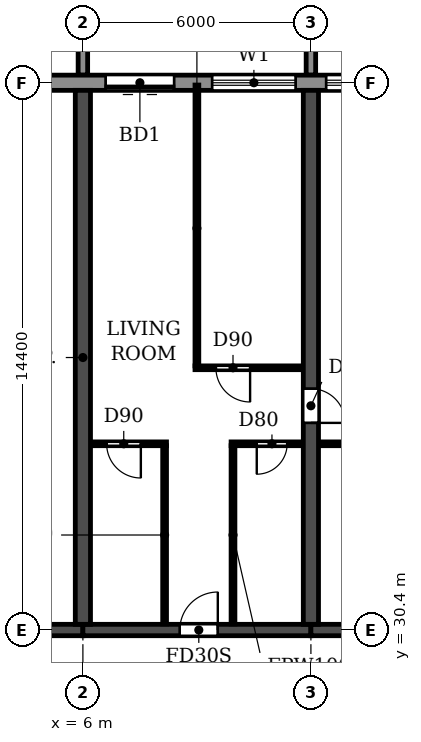
"""IFC4 building model, lengths in metres.
Left out: names, types, materials, properties, quantities, classifications, styles, units other than length and angle.
Written with IfcOpenShell. Run it as: python <this file> out.ifc"""

import sys

from ifc_helpers import new_model, si_unit, direction, frame, frame_2d, origin, place, context, subcontext, project, spatial, polyline, rectangle, outline, extrude, source, transform, mapped, element, fill, save


model = new_model("IFC4")
c1 = context("Model", 3, precision=1e-05, world=origin(), true_north=direction((0.0, 1.0)))
c2 = subcontext(c1, "Body", "Model", "MODEL_VIEW")
j1 = project(units=[si_unit("LENGTHUNIT", "METRE"), si_unit("PLANEANGLEUNIT", "RADIAN")], contexts=[c1])
p1 = place(None, origin())
s1 = spatial("IfcSite", under=j1, at=p1, CompositionType="ELEMENT")
p2 = place(p1, origin())
s2 = spatial("IfcBuilding", under=s1, at=p2, CompositionType="ELEMENT")
p3 = place(p2, frame((0.0, 0.0, 49.8)))
s3 = spatial("IfcBuildingStorey", under=s2, at=p3, CompositionType="ELEMENT", Elevation=49.8)
p4 = place(p3, frame((6.0, 30.55, 0.0), z_axis=(0.0, 0.0, 1.0), x_axis=(0.0, 1.0, 0.0)))
e1 = element("IfcWall", 1, at=p4, inside=s3, PredefinedType="SHEAR", context=c2, shape_type="SweptSolid", body=[
    extrude(rectangle(XDim=14.05, YDim=0.4, at=frame_2d((7.025, 0.0))), origin(), (0.0, 0.0, 1.0), 3.0),
])
p5 = place(p3, frame((12.0, 30.55, 0.0), z_axis=(0.0, 0.0, 1.0), x_axis=(0.0, 1.0, 0.0)))
e2 = element("IfcWall", 2, at=p5, inside=s3, PredefinedType="SHEAR", context=c2, shape_type="SweptSolid", body=[
    extrude(rectangle(XDim=14.05, YDim=0.4, at=frame_2d((7.025, 0.0))), origin(), (0.0, 0.0, 1.0), 3.0),
])
p6 = place(p5, frame((5.3, 0.0, 0.0)))
e3 = element("IfcOpeningElement", 3, at=p6, cuts=e2, PredefinedType="OPENING", context=c2, shape_type="SweptSolid", body=[
    extrude(rectangle(XDim=0.9, YDim=2.1, at=frame_2d((0.45, 1.05))), frame((0.0, 0.21, 0.0), z_axis=(0.0, -1.0, 0.0), x_axis=(1.0, 0.0, 0.0)), (0.0, 0.0, 1.0), 0.42),
])
p7 = place(p3, frame((0.2, 30.4, 0.0), z_axis=(0.0, 0.0, 1.0), x_axis=(1.0, 0.0, 0.0)))
e4 = element("IfcWall", 4, at=p7, inside=s3, PredefinedType="SHEAR", context=c2, shape_type="SweptSolid", body=[
    extrude(rectangle(XDim=5.8, YDim=0.3, at=frame_2d((2.9, 0.0))), origin(), (0.0, 0.0, 1.0), 2.4),
])
p8 = place(p7, frame((2.3, 0.0, 0.0)))
e5 = element("IfcOpeningElement", 5, at=p8, cuts=e4, PredefinedType="OPENING", context=c2, shape_type="SweptSolid", body=[
    extrude(rectangle(XDim=1.0, YDim=2.1, at=frame_2d((0.5, 1.05))), frame((0.0, 0.16, 0.0), z_axis=(0.0, -1.0, 0.0), x_axis=(1.0, 0.0, 0.0)), (0.0, 0.0, 1.0), 0.32),
])
p9 = place(p3, frame((6.0, 30.4, 0.0), z_axis=(0.0, 0.0, 1.0), x_axis=(1.0, 0.0, 0.0)))
e6 = element("IfcWall", 6, at=p9, inside=s3, PredefinedType="SHEAR", context=c2, shape_type="SweptSolid", body=[
    extrude(rectangle(XDim=6.0, YDim=0.3, at=frame_2d((3.0, 0.0))), origin(), (0.0, 0.0, 1.0), 2.4),
])
p10 = place(p9, frame((2.55, 0.0, 0.0)))
e7 = element("IfcOpeningElement", 7, at=p10, cuts=e6, PredefinedType="OPENING", context=c2, shape_type="SweptSolid", body=[
    extrude(rectangle(XDim=1.0, YDim=2.1, at=frame_2d((0.5, 1.05))), frame((0.0, 0.16, 0.0), z_axis=(0.0, -1.0, 0.0), x_axis=(1.0, 0.0, 0.0)), (0.0, 0.0, 1.0), 0.32),
])
p11 = place(p3, frame((12.0, 30.4, 0.0), z_axis=(0.0, 0.0, 1.0), x_axis=(1.0, 0.0, 0.0)))
e8 = element("IfcWall", 8, at=p11, inside=s3, PredefinedType="SHEAR", context=c2, shape_type="SweptSolid", body=[
    extrude(rectangle(XDim=6.0, YDim=0.3, at=frame_2d((3.0, 0.0))), origin(), (0.0, 0.0, 1.0), 2.4),
])
p12 = place(p3, frame((97.317, 44.8, 0.0), z_axis=(0.0, 0.0, 1.0), x_axis=(-1.0, 0.0, 0.0)))
e9 = element("IfcWall", 9, at=p12, inside=s3, PredefinedType="STANDARD", context=c2, shape_type="SweptSolid", body=[
    extrude(rectangle(XDim=92.634, YDim=0.4, at=frame_2d((46.317, 0.0))), origin(), (0.0, 0.0, 1.0), 3.0),
])
p13 = place(p12, frame((88.917, 0.0, 0.0)))
e10 = element("IfcOpeningElement", 10, at=p13, cuts=e9, PredefinedType="OPENING", context=c2, shape_type="SweptSolid", body=[
    extrude(rectangle(XDim=1.8, YDim=2.4, at=frame_2d((0.9, 1.2))), frame((0.0, 0.21, 0.0), z_axis=(0.0, -1.0, 0.0), x_axis=(1.0, 0.0, 0.0)), (0.0, 0.0, 1.0), 0.42),
])
p14 = place(p12, frame((85.717, 0.0, 0.9)))
e11 = element("IfcOpeningElement", 11, at=p14, cuts=e9, PredefinedType="OPENING", context=c2, shape_type="SweptSolid", body=[
    extrude(rectangle(XDim=2.2, YDim=1.5, at=frame_2d((1.1, 0.75))), frame((0.0, 0.21, 0.0), z_axis=(0.0, -1.0, 0.0), x_axis=(1.0, 0.0, 0.0)), (0.0, 0.0, 1.0), 0.42),
])
p15 = place(p12, frame((82.717, 0.0, 0.9)))
e12 = element("IfcOpeningElement", 12, at=p15, cuts=e9, PredefinedType="OPENING", context=c2, shape_type="SweptSolid", body=[
    extrude(rectangle(XDim=2.2, YDim=1.5, at=frame_2d((1.1, 0.75))), frame((0.0, 0.21, 0.0), z_axis=(0.0, -1.0, 0.0), x_axis=(1.0, 0.0, 0.0)), (0.0, 0.0, 1.0), 0.42),
])
p16 = place(p12, frame((79.717, 0.0, 0.9)))
e13 = element("IfcOpeningElement", 13, at=p16, cuts=e9, PredefinedType="OPENING", context=c2, shape_type="SweptSolid", body=[
    extrude(rectangle(XDim=2.2, YDim=1.5, at=frame_2d((1.1, 0.75))), frame((0.0, 0.21, 0.0), z_axis=(0.0, -1.0, 0.0), x_axis=(1.0, 0.0, 0.0)), (0.0, 0.0, 1.0), 0.42),
])
p17 = place(p12, frame((76.717, 0.0, 0.9)))
e14 = element("IfcOpeningElement", 14, at=p17, cuts=e9, PredefinedType="OPENING", context=c2, shape_type="SweptSolid", body=[
    extrude(rectangle(XDim=2.2, YDim=1.5, at=frame_2d((1.1, 0.75))), frame((0.0, 0.21, 0.0), z_axis=(0.0, -1.0, 0.0), x_axis=(1.0, 0.0, 0.0)), (0.0, 0.0, 1.0), 0.42),
])
p18 = place(p12, frame((73.917, 0.0, 0.0)))
e15 = element("IfcOpeningElement", 15, at=p18, cuts=e9, PredefinedType="OPENING", context=c2, shape_type="SweptSolid", body=[
    extrude(rectangle(XDim=1.8, YDim=2.4, at=frame_2d((0.9, 1.2))), frame((0.0, 0.21, 0.0), z_axis=(0.0, -1.0, 0.0), x_axis=(1.0, 0.0, 0.0)), (0.0, 0.0, 1.0), 0.42),
])
p19 = place(p12, frame((70.717, 0.0, 0.9)))
e16 = element("IfcOpeningElement", 16, at=p19, cuts=e9, PredefinedType="OPENING", context=c2, shape_type="SweptSolid", body=[
    extrude(rectangle(XDim=2.2, YDim=1.5, at=frame_2d((1.1, 0.75))), frame((0.0, 0.21, 0.0), z_axis=(0.0, -1.0, 0.0), x_axis=(1.0, 0.0, 0.0)), (0.0, 0.0, 1.0), 0.42),
])
p20 = place(p12, frame((67.717, 0.0, 0.9)))
e17 = element("IfcOpeningElement", 17, at=p20, cuts=e9, PredefinedType="OPENING", context=c2, shape_type="SweptSolid", body=[
    extrude(rectangle(XDim=2.2, YDim=1.5, at=frame_2d((1.1, 0.75))), frame((0.0, 0.21, 0.0), z_axis=(0.0, -1.0, 0.0), x_axis=(1.0, 0.0, 0.0)), (0.0, 0.0, 1.0), 0.42),
])
p21 = place(p12, frame((64.717, 0.0, 0.9)))
e18 = element("IfcOpeningElement", 18, at=p21, cuts=e9, PredefinedType="OPENING", context=c2, shape_type="SweptSolid", body=[
    extrude(rectangle(XDim=2.2, YDim=1.5, at=frame_2d((1.1, 0.75))), frame((0.0, 0.21, 0.0), z_axis=(0.0, -1.0, 0.0), x_axis=(1.0, 0.0, 0.0)), (0.0, 0.0, 1.0), 0.42),
])
p22 = place(p12, frame((61.917, 0.0, 0.0)))
e19 = element("IfcOpeningElement", 19, at=p22, cuts=e9, PredefinedType="OPENING", context=c2, shape_type="SweptSolid", body=[
    extrude(rectangle(XDim=1.8, YDim=2.4, at=frame_2d((0.9, 1.2))), frame((0.0, 0.21, 0.0), z_axis=(0.0, -1.0, 0.0), x_axis=(1.0, 0.0, 0.0)), (0.0, 0.0, 1.0), 0.42),
])
p23 = place(p12, frame((58.717, 0.0, 0.9)))
e20 = element("IfcOpeningElement", 20, at=p23, cuts=e9, PredefinedType="OPENING", context=c2, shape_type="SweptSolid", body=[
    extrude(rectangle(XDim=2.2, YDim=1.5, at=frame_2d((1.1, 0.75))), frame((0.0, 0.21, 0.0), z_axis=(0.0, -1.0, 0.0), x_axis=(1.0, 0.0, 0.0)), (0.0, 0.0, 1.0), 0.42),
])
p24 = place(p12, frame((55.717, 0.0, 0.9)))
e21 = element("IfcOpeningElement", 21, at=p24, cuts=e9, PredefinedType="OPENING", context=c2, shape_type="SweptSolid", body=[
    extrude(rectangle(XDim=2.2, YDim=1.5, at=frame_2d((1.1, 0.75))), frame((0.0, 0.21, 0.0), z_axis=(0.0, -1.0, 0.0), x_axis=(1.0, 0.0, 0.0)), (0.0, 0.0, 1.0), 0.42),
])
p25 = place(p12, frame((52.717, 0.0, 0.9)))
e22 = element("IfcOpeningElement", 22, at=p25, cuts=e9, PredefinedType="OPENING", context=c2, shape_type="SweptSolid", body=[
    extrude(rectangle(XDim=2.2, YDim=1.5, at=frame_2d((1.1, 0.75))), frame((0.0, 0.21, 0.0), z_axis=(0.0, -1.0, 0.0), x_axis=(1.0, 0.0, 0.0)), (0.0, 0.0, 1.0), 0.42),
])
p26 = place(p12, frame((49.917, 0.0, 0.0)))
e23 = element("IfcOpeningElement", 23, at=p26, cuts=e9, PredefinedType="OPENING", context=c2, shape_type="SweptSolid", body=[
    extrude(rectangle(XDim=1.8, YDim=2.4, at=frame_2d((0.9, 1.2))), frame((0.0, 0.21, 0.0), z_axis=(0.0, -1.0, 0.0), x_axis=(1.0, 0.0, 0.0)), (0.0, 0.0, 1.0), 0.42),
])
p27 = place(p12, frame((46.717, 0.0, 0.9)))
e24 = element("IfcOpeningElement", 24, at=p27, cuts=e9, PredefinedType="OPENING", context=c2, shape_type="SweptSolid", body=[
    extrude(rectangle(XDim=2.2, YDim=1.5, at=frame_2d((1.1, 0.75))), frame((0.0, 0.21, 0.0), z_axis=(0.0, -1.0, 0.0), x_axis=(1.0, 0.0, 0.0)), (0.0, 0.0, 1.0), 0.42),
])
p28 = place(p12, frame((43.717, 0.0, 0.9)))
e25 = element("IfcOpeningElement", 25, at=p28, cuts=e9, PredefinedType="OPENING", context=c2, shape_type="SweptSolid", body=[
    extrude(rectangle(XDim=2.2, YDim=1.5, at=frame_2d((1.1, 0.75))), frame((0.0, 0.21, 0.0), z_axis=(0.0, -1.0, 0.0), x_axis=(1.0, 0.0, 0.0)), (0.0, 0.0, 1.0), 0.42),
])
p29 = place(p12, frame((40.717, 0.0, 0.9)))
e26 = element("IfcOpeningElement", 26, at=p29, cuts=e9, PredefinedType="OPENING", context=c2, shape_type="SweptSolid", body=[
    extrude(rectangle(XDim=2.2, YDim=1.5, at=frame_2d((1.1, 0.75))), frame((0.0, 0.21, 0.0), z_axis=(0.0, -1.0, 0.0), x_axis=(1.0, 0.0, 0.0)), (0.0, 0.0, 1.0), 0.42),
])
p30 = place(p12, frame((37.917, 0.0, 0.0)))
e27 = element("IfcOpeningElement", 27, at=p30, cuts=e9, PredefinedType="OPENING", context=c2, shape_type="SweptSolid", body=[
    extrude(rectangle(XDim=1.8, YDim=2.4, at=frame_2d((0.9, 1.2))), frame((0.0, 0.21, 0.0), z_axis=(0.0, -1.0, 0.0), x_axis=(1.0, 0.0, 0.0)), (0.0, 0.0, 1.0), 0.42),
])
p31 = place(p12, frame((34.717, 0.0, 0.9)))
e28 = element("IfcOpeningElement", 28, at=p31, cuts=e9, PredefinedType="OPENING", context=c2, shape_type="SweptSolid", body=[
    extrude(rectangle(XDim=2.2, YDim=1.5, at=frame_2d((1.1, 0.75))), frame((0.0, 0.21, 0.0), z_axis=(0.0, -1.0, 0.0), x_axis=(1.0, 0.0, 0.0)), (0.0, 0.0, 1.0), 0.42),
])
p32 = place(p12, frame((31.717, 0.0, 0.9)))
e29 = element("IfcOpeningElement", 29, at=p32, cuts=e9, PredefinedType="OPENING", context=c2, shape_type="SweptSolid", body=[
    extrude(rectangle(XDim=2.2, YDim=1.5, at=frame_2d((1.1, 0.75))), frame((0.0, 0.21, 0.0), z_axis=(0.0, -1.0, 0.0), x_axis=(1.0, 0.0, 0.0)), (0.0, 0.0, 1.0), 0.42),
])
p33 = place(p12, frame((28.717, 0.0, 0.9)))
e30 = element("IfcOpeningElement", 30, at=p33, cuts=e9, PredefinedType="OPENING", context=c2, shape_type="SweptSolid", body=[
    extrude(rectangle(XDim=2.2, YDim=1.5, at=frame_2d((1.1, 0.75))), frame((0.0, 0.21, 0.0), z_axis=(0.0, -1.0, 0.0), x_axis=(1.0, 0.0, 0.0)), (0.0, 0.0, 1.0), 0.42),
])
p34 = place(p12, frame((25.917, 0.0, 0.0)))
e31 = element("IfcOpeningElement", 31, at=p34, cuts=e9, PredefinedType="OPENING", context=c2, shape_type="SweptSolid", body=[
    extrude(rectangle(XDim=1.8, YDim=2.4, at=frame_2d((0.9, 1.2))), frame((0.0, 0.21, 0.0), z_axis=(0.0, -1.0, 0.0), x_axis=(1.0, 0.0, 0.0)), (0.0, 0.0, 1.0), 0.42),
])
p35 = place(p12, frame((22.917, 0.0, 0.0)))
e32 = element("IfcOpeningElement", 32, at=p35, cuts=e9, PredefinedType="OPENING", context=c2, shape_type="SweptSolid", body=[
    extrude(rectangle(XDim=1.8, YDim=2.4, at=frame_2d((0.9, 1.2))), frame((0.0, 0.21, 0.0), z_axis=(0.0, -1.0, 0.0), x_axis=(1.0, 0.0, 0.0)), (0.0, 0.0, 1.0), 0.42),
])
p36 = place(p12, frame((19.717, 0.0, 0.9)))
e33 = element("IfcOpeningElement", 33, at=p36, cuts=e9, PredefinedType="OPENING", context=c2, shape_type="SweptSolid", body=[
    extrude(rectangle(XDim=2.2, YDim=1.5, at=frame_2d((1.1, 0.75))), frame((0.0, 0.21, 0.0), z_axis=(0.0, -1.0, 0.0), x_axis=(1.0, 0.0, 0.0)), (0.0, 0.0, 1.0), 0.42),
])
p37 = place(p12, frame((16.717, 0.0, 0.9)))
e34 = element("IfcOpeningElement", 34, at=p37, cuts=e9, PredefinedType="OPENING", context=c2, shape_type="SweptSolid", body=[
    extrude(rectangle(XDim=2.2, YDim=1.5, at=frame_2d((1.1, 0.75))), frame((0.0, 0.21, 0.0), z_axis=(0.0, -1.0, 0.0), x_axis=(1.0, 0.0, 0.0)), (0.0, 0.0, 1.0), 0.42),
])
p38 = place(p12, frame((13.717, 0.0, 0.9)))
e35 = element("IfcOpeningElement", 35, at=p38, cuts=e9, PredefinedType="OPENING", context=c2, shape_type="SweptSolid", body=[
    extrude(rectangle(XDim=2.2, YDim=1.5, at=frame_2d((1.1, 0.75))), frame((0.0, 0.21, 0.0), z_axis=(0.0, -1.0, 0.0), x_axis=(1.0, 0.0, 0.0)), (0.0, 0.0, 1.0), 0.42),
])
p39 = place(p12, frame((10.717, 0.0, 0.9)))
e36 = element("IfcOpeningElement", 36, at=p39, cuts=e9, PredefinedType="OPENING", context=c2, shape_type="SweptSolid", body=[
    extrude(rectangle(XDim=2.2, YDim=1.5, at=frame_2d((1.1, 0.75))), frame((0.0, 0.21, 0.0), z_axis=(0.0, -1.0, 0.0), x_axis=(1.0, 0.0, 0.0)), (0.0, 0.0, 1.0), 0.42),
])
p40 = place(p12, frame((7.917, 0.0, 0.0)))
e37 = element("IfcOpeningElement", 37, at=p40, cuts=e9, PredefinedType="OPENING", context=c2, shape_type="SweptSolid", body=[
    extrude(rectangle(XDim=1.8, YDim=2.4, at=frame_2d((0.9, 1.2))), frame((0.0, 0.21, 0.0), z_axis=(0.0, -1.0, 0.0), x_axis=(1.0, 0.0, 0.0)), (0.0, 0.0, 1.0), 0.42),
])
p41 = place(p12, frame((4.717, 0.0, 0.9)))
e38 = element("IfcOpeningElement", 38, at=p41, cuts=e9, PredefinedType="OPENING", context=c2, shape_type="SweptSolid", body=[
    extrude(rectangle(XDim=2.2, YDim=1.5, at=frame_2d((1.1, 0.75))), frame((0.0, 0.21, 0.0), z_axis=(0.0, -1.0, 0.0), x_axis=(1.0, 0.0, 0.0)), (0.0, 0.0, 1.0), 0.42),
])
p42 = place(p12, frame((1.917, 0.0, 0.0)))
e39 = element("IfcOpeningElement", 39, at=p42, cuts=e9, PredefinedType="OPENING", context=c2, shape_type="SweptSolid", body=[
    extrude(rectangle(XDim=1.8, YDim=2.4, at=frame_2d((0.9, 1.2))), frame((0.0, 0.21, 0.0), z_axis=(0.0, -1.0, 0.0), x_axis=(1.0, 0.0, 0.0)), (0.0, 0.0, 1.0), 0.42),
])
m1 = source(origin(), c2, "Body", "SweptSolid", [
    extrude(outline(polyline([(0.0, 0.0), (0.25, 0.0), (0.25, 3.1), (0.0, 3.1), (0.0, 0.0)])), origin(), (0.0, 0.0, 1.0), 3.1),
])
for number, where in (
    (40, (5.875, 45.0, 0.0)),
    (41, (11.875, 45.0, 0.0)),
):
    element("IfcWall", number, at=place(p3, frame(where)), inside=s3, PredefinedType="STANDARD", context=c2, shape_type="MappedRepresentation", body=[
        mapped(m1, transform((0.0, 0.0, 0.0))),
    ])
p43 = place(p3, frame((6.21, 35.3, 0.0), z_axis=(0.0, 0.0, 1.0), x_axis=(1.0, 0.0, 0.0)))
e42 = element("IfcWall", 42, at=p43, inside=s3, PredefinedType="PARTITIONING", context=c2, shape_type="SweptSolid", body=[
    extrude(rectangle(XDim=1.99, YDim=0.1, at=frame_2d((0.995, 0.0))), origin(), (0.0, 0.0, 1.0), 3.0),
])
p44 = place(p43, frame((0.415, 0.0, 0.0)))
e43 = element("IfcOpeningElement", 43, at=p44, cuts=e42, PredefinedType="OPENING", context=c2, shape_type="SweptSolid", body=[
    extrude(rectangle(XDim=0.9, YDim=2.1, at=frame_2d((0.45, 1.05))), frame((0.0, 0.06, 0.0), z_axis=(0.0, -1.0, 0.0), x_axis=(1.0, 0.0, 0.0)), (0.0, 0.0, 1.0), 0.12),
])
p45 = place(p3, frame((9.9, 35.3, 0.0), z_axis=(0.0, 0.0, 1.0), x_axis=(1.0, 0.0, 0.0)))
e44 = element("IfcWall", 44, at=p45, inside=s3, PredefinedType="PARTITIONING", context=c2, shape_type="SweptSolid", body=[
    extrude(rectangle(XDim=1.89, YDim=0.1, at=frame_2d((0.945, 0.0))), origin(), (0.0, 0.0, 1.0), 3.0),
])
p46 = place(p45, frame((0.675, 0.0, 0.0)))
e45 = element("IfcOpeningElement", 45, at=p46, cuts=e44, PredefinedType="OPENING", context=c2, shape_type="SweptSolid", body=[
    extrude(rectangle(XDim=0.8, YDim=2.1, at=frame_2d((0.4, 1.05))), frame((0.0, 0.06, 0.0), z_axis=(0.0, -1.0, 0.0), x_axis=(1.0, 0.0, 0.0)), (0.0, 0.0, 1.0), 0.12),
])
p47 = place(p3, frame((12.21, 35.3, 0.0), z_axis=(0.0, 0.0, 1.0), x_axis=(1.0, 0.0, 0.0)))
e46 = element("IfcWall", 46, at=p47, inside=s3, PredefinedType="PARTITIONING", context=c2, shape_type="SweptSolid", body=[
    extrude(rectangle(XDim=2.89, YDim=0.1, at=frame_2d((1.445, 0.0))), origin(), (0.0, 0.0, 1.0), 3.0),
])
p48 = place(p47, frame((0.89, 0.0, 0.0)))
e47 = element("IfcOpeningElement", 47, at=p48, cuts=e46, PredefinedType="OPENING", context=c2, shape_type="SweptSolid", body=[
    extrude(rectangle(XDim=0.8, YDim=2.1, at=frame_2d((0.4, 1.05))), frame((0.0, 0.06, 0.0), z_axis=(0.0, -1.0, 0.0), x_axis=(1.0, 0.0, 0.0)), (0.0, 0.0, 1.0), 0.12),
])
p49 = place(p3, frame((8.95, 37.3, 0.0), z_axis=(0.0, 0.0, 1.0), x_axis=(1.0, 0.0, 0.0)))
e48 = element("IfcWall", 48, at=p49, inside=s3, PredefinedType="PARTITIONING", context=c2, shape_type="SweptSolid", body=[
    extrude(rectangle(XDim=2.84, YDim=0.1, at=frame_2d((1.42, 0.0))), origin(), (0.0, 0.0, 1.0), 3.0),
])
p50 = place(p49, frame((0.55, 0.0, 0.0)))
e49 = element("IfcOpeningElement", 49, at=p50, cuts=e48, PredefinedType="OPENING", context=c2, shape_type="SweptSolid", body=[
    extrude(rectangle(XDim=0.9, YDim=2.1, at=frame_2d((0.45, 1.05))), frame((0.0, 0.06, 0.0), z_axis=(0.0, -1.0, 0.0), x_axis=(1.0, 0.0, 0.0)), (0.0, 0.0, 1.0), 0.12),
])
p51 = place(p3, frame((8.15, 30.56, 0.0), z_axis=(0.0, 0.0, 1.0), x_axis=(0.0, 1.0, 0.0)))
e50 = element("IfcWall", 50, at=p51, inside=s3, PredefinedType="PARTITIONING", context=c2, shape_type="SweptSolid", body=[
    extrude(rectangle(XDim=4.69, YDim=0.1, at=frame_2d((2.345, 0.0))), origin(), (0.0, 0.0, 1.0), 3.0),
])
p52 = place(p3, frame((9.0, 37.35, 0.0), z_axis=(0.0, 0.0, 1.0), x_axis=(0.0, 1.0, 0.0)))
e51 = element("IfcWall", 51, at=p52, inside=s3, PredefinedType="PARTITIONING", context=c2, shape_type="SweptSolid", body=[
    extrude(rectangle(XDim=7.39, YDim=0.1, at=frame_2d((3.695, 0.0))), origin(), (0.0, 0.0, 1.0), 3.0),
])
p53 = place(p3, frame((9.95, 30.56, 0.0), z_axis=(0.0, 0.0, 1.0), x_axis=(0.0, 1.0, 0.0)))
e52 = element("IfcWall", 52, at=p53, inside=s3, PredefinedType="PARTITIONING", context=c2, shape_type="SweptSolid", body=[
    extrude(rectangle(XDim=4.69, YDim=0.1, at=frame_2d((2.345, 0.0))), origin(), (0.0, 0.0, 1.0), 3.0),
])
p54 = place(p13, origin())
e53 = element("IfcDoor", 53, at=p54, inside=s3, OperationType="DOUBLE_DOOR_SLIDING", PredefinedType="DOOR", context=c2, shape_type="SweptSolid", body=[
    extrude(rectangle(XDim=1.8, YDim=2.4, at=frame_2d((0.9, 1.2))), frame((0.0, 0.025, 0.0), z_axis=(0.0, -1.0, 0.0), x_axis=(1.0, 0.0, 0.0)), (0.0, 0.0, 1.0), 0.05),
])
fill(e10, e53)
p55 = place(p14, origin())
e54 = element("IfcWindow", 54, at=p55, inside=s3, PartitioningType="DOUBLE_PANEL_HORIZONTAL", PredefinedType="WINDOW", context=c2, shape_type="SweptSolid", body=[
    extrude(rectangle(XDim=2.2, YDim=1.5, at=frame_2d((1.1, 0.75))), frame((0.0, 0.03, 0.0), z_axis=(0.0, -1.0, 0.0), x_axis=(1.0, 0.0, 0.0)), (0.0, 0.0, 1.0), 0.06),
])
fill(e11, e54)
p56 = place(p15, origin())
e55 = element("IfcWindow", 55, at=p56, inside=s3, PartitioningType="DOUBLE_PANEL_HORIZONTAL", PredefinedType="WINDOW", context=c2, shape_type="SweptSolid", body=[
    extrude(rectangle(XDim=2.2, YDim=1.5, at=frame_2d((1.1, 0.75))), frame((0.0, 0.03, 0.0), z_axis=(0.0, -1.0, 0.0), x_axis=(1.0, 0.0, 0.0)), (0.0, 0.0, 1.0), 0.06),
])
fill(e12, e55)
p57 = place(p44, frame((0.9, 0.0, 0.0), z_axis=(0.0, 0.0, 1.0), x_axis=(-1.0, 0.0, 0.0)))
e56 = element("IfcDoor", 56, at=p57, inside=s3, OperationType="SINGLE_SWING_LEFT", PredefinedType="DOOR", context=c2, shape_type="SweptSolid", body=[
    extrude(rectangle(XDim=0.9, YDim=2.1, at=frame_2d((0.45, 1.05))), frame((0.0, 0.025, 0.0), z_axis=(0.0, -1.0, 0.0), x_axis=(1.0, 0.0, 0.0)), (0.0, 0.0, 1.0), 0.05),
])
fill(e43, e56)
p58 = place(p10, origin())
e57 = element("IfcDoor", 57, at=p58, inside=s3, OperationType="SINGLE_SWING_RIGHT", PredefinedType="DOOR", context=c2, shape_type="SweptSolid", body=[
    extrude(rectangle(XDim=1.0, YDim=2.1, at=frame_2d((0.5, 1.05))), frame((0.0, 0.025, 0.0), z_axis=(0.0, -1.0, 0.0), x_axis=(1.0, 0.0, 0.0)), (0.0, 0.0, 1.0), 0.05),
])
fill(e7, e57)
p59 = place(p50, frame((0.9, 0.0, 0.0), z_axis=(0.0, 0.0, 1.0), x_axis=(-1.0, 0.0, 0.0)))
e58 = element("IfcDoor", 58, at=p59, inside=s3, OperationType="SINGLE_SWING_LEFT", PredefinedType="DOOR", context=c2, shape_type="SweptSolid", body=[
    extrude(rectangle(XDim=0.9, YDim=2.1, at=frame_2d((0.45, 1.05))), frame((0.0, 0.025, 0.0), z_axis=(0.0, -1.0, 0.0), x_axis=(1.0, 0.0, 0.0)), (0.0, 0.0, 1.0), 0.05),
])
fill(e49, e58)
p60 = place(p46, frame((0.8, 0.0, 0.0), z_axis=(0.0, 0.0, 1.0), x_axis=(-1.0, 0.0, 0.0)))
e59 = element("IfcDoor", 59, at=p60, inside=s3, OperationType="SINGLE_SWING_RIGHT", PredefinedType="DOOR", context=c2, shape_type="SweptSolid", body=[
    extrude(rectangle(XDim=0.8, YDim=2.1, at=frame_2d((0.4, 1.05))), frame((0.0, 0.025, 0.0), z_axis=(0.0, -1.0, 0.0), x_axis=(1.0, 0.0, 0.0)), (0.0, 0.0, 1.0), 0.05),
])
fill(e45, e59)
p61 = place(p6, frame((0.9, 0.0, 0.0), z_axis=(0.0, 0.0, 1.0), x_axis=(-1.0, 0.0, 0.0)))
e60 = element("IfcDoor", 60, at=p61, inside=s3, OperationType="SINGLE_SWING_RIGHT", PredefinedType="DOOR", context=c2, shape_type="SweptSolid", body=[
    extrude(rectangle(XDim=0.9, YDim=2.1, at=frame_2d((0.45, 1.05))), frame((0.0, 0.025, 0.0), z_axis=(0.0, -1.0, 0.0), x_axis=(1.0, 0.0, 0.0)), (0.0, 0.0, 1.0), 0.05),
])
fill(e3, e60)
save(model, sys.argv[1])
